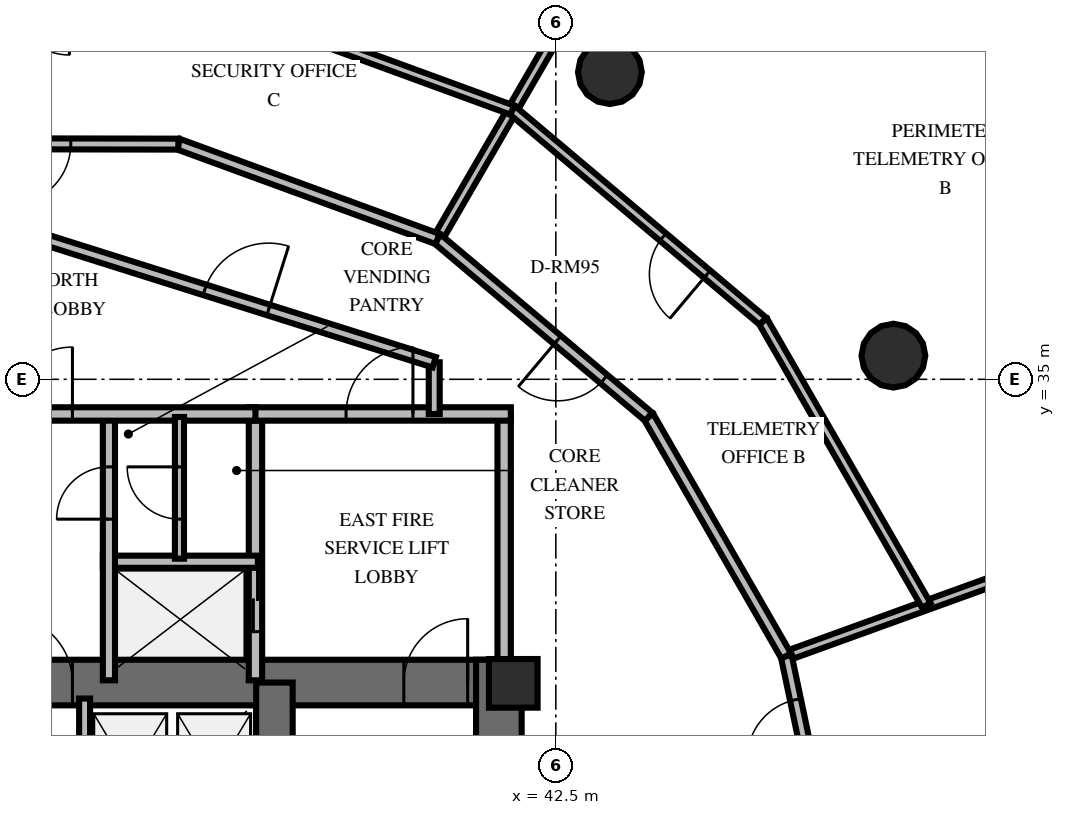
"""IFC4 building model, lengths in metres.
Left out: names, types, materials, properties, quantities, classifications, styles, units other than length and angle.
Written with IfcOpenShell. Run it as: python <this file> out.ifc"""

import sys

from ifc_helpers import new_model, si_unit, direction, frame, frame_2d, origin, origin_2d, place, context, subcontext, project, spatial, rectangle, circle, extrude, element, fill, save


model = new_model("IFC4")
c1 = context("Model", 3, precision=1e-05, world=origin(), true_north=direction((0.0, 1.0)))
c2 = subcontext(c1, "Body", "Model", "MODEL_VIEW")
j1 = project(units=[si_unit("LENGTHUNIT", "METRE"), si_unit("PLANEANGLEUNIT", "RADIAN")], contexts=[c1])
p1 = place(None, origin())
s1 = spatial("IfcSite", under=j1, at=p1, CompositionType="ELEMENT")
p2 = place(p1, origin())
s2 = spatial("IfcBuilding", under=s1, at=p2, CompositionType="ELEMENT")
p3 = place(p2, frame((0.0, 0.0, 198.8)))
s3 = spatial("IfcBuildingStorey", under=s2, at=p3, CompositionType="ELEMENT", Elevation=198.8)
p4 = place(p3, frame((26.072, 30.013, 0.0), z_axis=(0.0, 0.0, 1.0), x_axis=(1.0, 0.0, 0.0)))
e1 = element("IfcWall", 1, at=p4, inside=s3, PredefinedType="SHEAR", context=c2, shape_type="SweptSolid", body=[
    extrude(rectangle(XDim=15.866, YDim=0.75, at=frame_2d((7.933, 0.0))), origin(), (0.0, 0.0, 1.0), 3.6),
])
p5 = place(p4, frame((0.878, 0.0, 0.0)))
e2 = element("IfcOpeningElement", 2, at=p5, cuts=e1, PredefinedType="OPENING", context=c2, shape_type="SweptSolid", body=[
    extrude(rectangle(XDim=1.05, YDim=2.15, at=frame_2d((0.525, 1.075))), frame((0.0, 0.385, 0.0), z_axis=(0.0, -1.0, 0.0), x_axis=(1.0, 0.0, 0.0)), (0.0, 0.0, 1.0), 0.77),
])
p6 = place(p4, frame((13.928, 0.0, 0.0)))
e3 = element("IfcOpeningElement", 3, at=p6, cuts=e1, PredefinedType="OPENING", context=c2, shape_type="SweptSolid", body=[
    extrude(rectangle(XDim=1.05, YDim=2.15, at=frame_2d((0.525, 1.075))), frame((0.0, 0.385, 0.0), z_axis=(0.0, -1.0, 0.0), x_axis=(1.0, 0.0, 0.0)), (0.0, 0.0, 1.0), 0.77),
])
p7 = place(p4, frame((7.378, 0.0, 0.0)))
e4 = element("IfcOpeningElement", 4, at=p7, cuts=e1, PredefinedType="OPENING", context=c2, shape_type="SweptSolid", body=[
    extrude(rectangle(XDim=1.1, YDim=2.15, at=frame_2d((0.55, 1.075))), frame((0.0, 0.385, 0.0), z_axis=(0.0, -1.0, 0.0), x_axis=(1.0, 0.0, 0.0)), (0.0, 0.0, 1.0), 0.77),
])
p8 = place(p3, frame((41.563, 19.812, 0.0), z_axis=(0.0, 0.0, 1.0), x_axis=(0.0, 1.0, 0.0)))
e5 = element("IfcWall", 5, at=p8, inside=s3, PredefinedType="SHEAR", context=c2, shape_type="SweptSolid", body=[
    extrude(rectangle(XDim=10.576, YDim=0.75, at=frame_2d((5.288, 0.0))), origin(), (0.0, 0.0, 1.0), 3.6),
])
p9 = place(p3, frame((37.872, 20.187, 0.0), z_axis=(0.0, 0.0, 1.0), x_axis=(0.0, 1.0, 0.0)))
e6 = element("IfcWall", 6, at=p9, inside=s3, PredefinedType="SHEAR", context=c2, shape_type="SweptSolid", body=[
    extrude(rectangle(XDim=9.826, YDim=0.6, at=frame_2d((4.913, 0.0))), origin(), (0.0, 0.0, 1.0), 3.6),
])
p10 = place(p3, frame((41.8, 30.0, 0.0), z_axis=(0.0, 0.0, 1.0), x_axis=(1.0, 0.0, 0.0)))
e7 = element("IfcColumn", 7, at=p10, inside=s3, PredefinedType="PILASTER", context=c2, shape_type="SweptSolid", body=[
    extrude(rectangle(XDim=0.8, YDim=0.8, at=origin_2d()), origin(), (0.0, 0.0, 1.0), 3.6),
])
for number, where, z_axis, x_axis in (
    (8, (48.052, 35.389, 0.0), (0.0, 0.0, 1.0), (1.0, 0.0, 0.0)),
    (9, (43.389, 40.052, 0.0), (0.0, 0.0, 1.0), (1.0, 0.0, 0.0)),
):
    element("IfcColumn", number, at=place(p3, frame(where, z_axis=z_axis, x_axis=x_axis)), inside=s3, PredefinedType="COLUMN", context=c2, shape_type="SweptSolid", body=[
        extrude(circle(Radius=0.525, at=origin_2d()), origin(), (0.0, 0.0, 1.0), 3.6),
    ])
p11 = place(p3, frame((37.56, 30.05, 0.0), z_axis=(0.0, 0.0, 1.0), x_axis=(0.0, 1.0, 0.0)))
e10 = element("IfcWall", 10, at=p11, inside=s3, PredefinedType="SOLIDWALL", context=c2, shape_type="SweptSolid", body=[
    extrude(rectangle(XDim=4.38, YDim=0.22, at=frame_2d((2.19, 0.0))), origin(), (0.0, 0.0, 1.0), 2.46),
])
p12 = place(p11, frame((0.8, 0.0, 0.0)))
e11 = element("IfcOpeningElement", 11, at=p12, cuts=e10, PredefinedType="OPENING", context=c2, shape_type="SweptSolid", body=[
    extrude(rectangle(XDim=1.05, YDim=2.1, at=frame_2d((0.525, 1.05))), frame((0.0, 0.12, 0.0), z_axis=(0.0, -1.0, 0.0), x_axis=(1.0, 0.0, 0.0)), (0.0, 0.0, 1.0), 0.24),
])
p13 = place(p3, frame((41.65, 30.05, 0.0), z_axis=(0.0, 0.0, 1.0), x_axis=(0.0, 1.0, 0.0)))
e12 = element("IfcWall", 12, at=p13, inside=s3, PredefinedType="SOLIDWALL", context=c2, shape_type="SweptSolid", body=[
    extrude(rectangle(XDim=4.38, YDim=0.22, at=frame_2d((2.19, 0.0))), origin(), (0.0, 0.0, 1.0), 2.46),
])
p14 = place(p3, frame((37.45, 34.43, 0.0), z_axis=(0.0, 0.0, 1.0), x_axis=(1.0, 0.0, 0.0)))
e13 = element("IfcWall", 13, at=p14, inside=s3, PredefinedType="SOLIDWALL", context=c2, shape_type="SweptSolid", body=[
    extrude(rectangle(XDim=4.31, YDim=0.22, at=frame_2d((2.155, 0.0))), origin(), (0.0, 0.0, 1.0), 2.46),
])
p15 = place(p14, frame((1.6, 0.0, 0.0)))
e14 = element("IfcOpeningElement", 14, at=p15, cuts=e13, PredefinedType="OPENING", context=c2, shape_type="SweptSolid", body=[
    extrude(rectangle(XDim=1.1, YDim=2.15, at=frame_2d((0.55, 1.075))), frame((0.0, 0.12, 0.0), z_axis=(0.0, -1.0, 0.0), x_axis=(1.0, 0.0, 0.0)), (0.0, 0.0, 1.0), 0.24),
])
p16 = place(p3, frame((35.05, 32.0, 0.0), z_axis=(0.0, 0.0, 1.0), x_axis=(1.0, 0.0, 0.0)))
e15 = element("IfcWall", 15, at=p16, inside=s3, PredefinedType="SOLIDWALL", context=c2, shape_type="SweptSolid", body=[
    extrude(rectangle(XDim=2.55, YDim=0.2, at=frame_2d((1.275, 0.0))), origin(), (0.0, 0.0, 1.0), 2.46),
])
p17 = place(p3, frame((35.15, 30.05, 0.0), z_axis=(0.0, 0.0, 1.0), x_axis=(0.0, 1.0, 0.0)))
e16 = element("IfcWall", 16, at=p17, inside=s3, PredefinedType="SOLIDWALL", context=c2, shape_type="SweptSolid", body=[
    extrude(rectangle(XDim=4.38, YDim=0.2, at=frame_2d((2.19, 0.0))), origin(), (0.0, 0.0, 1.0), 2.46),
])
p18 = place(p17, frame((2.65, 0.0, 0.0)))
e17 = element("IfcOpeningElement", 17, at=p18, cuts=e16, PredefinedType="OPENING", context=c2, shape_type="SweptSolid", body=[
    extrude(rectangle(XDim=0.86, YDim=2.05, at=frame_2d((0.43, 1.025))), frame((0.0, 0.11, 0.0), z_axis=(0.0, -1.0, 0.0), x_axis=(1.0, 0.0, 0.0)), (0.0, 0.0, 1.0), 0.22),
])
p19 = place(p3, frame((30.44, 34.43, 0.0), z_axis=(0.0, 0.0, 1.0), x_axis=(1.0, 0.0, 0.0)))
e18 = element("IfcWall", 18, at=p19, inside=s3, PredefinedType="SOLIDWALL", context=c2, shape_type="SweptSolid", body=[
    extrude(rectangle(XDim=7.12, YDim=0.22, at=frame_2d((3.56, 0.0))), origin(), (0.0, 0.0, 1.0), 2.46),
])
p20 = place(p19, frame((3.01, 0.0, 0.0)))
e19 = element("IfcOpeningElement", 19, at=p20, cuts=e18, PredefinedType="OPENING", context=c2, shape_type="SweptSolid", body=[
    extrude(rectangle(XDim=1.1, YDim=2.15, at=frame_2d((0.55, 1.075))), frame((0.0, 0.12, 0.0), z_axis=(0.0, -1.0, 0.0), x_axis=(1.0, 0.0, 0.0)), (0.0, 0.0, 1.0), 0.24),
])
p21 = place(p3, frame((36.31, 32.05, 0.0), z_axis=(0.0, 0.0, 1.0), x_axis=(0.0, 1.0, 0.0)))
e20 = element("IfcWall", 20, at=p21, inside=s3, PredefinedType="PARTITIONING", context=c2, shape_type="SweptSolid", body=[
    extrude(rectangle(XDim=2.33, YDim=0.15, at=frame_2d((1.165, 0.0))), origin(), (0.0, 0.0, 1.0), 2.46),
])
p22 = place(p21, frame((0.65, 0.0, 0.0)))
e21 = element("IfcOpeningElement", 21, at=p22, cuts=e20, PredefinedType="OPENING", context=c2, shape_type="SweptSolid", body=[
    extrude(rectangle(XDim=0.86, YDim=2.05, at=frame_2d((0.43, 1.025))), frame((0.0, 0.085, 0.0), z_axis=(0.0, -1.0, 0.0), x_axis=(1.0, 0.0, 0.0)), (0.0, 0.0, 1.0), 0.17),
])
p23 = place(p3, frame((34.75, 27.28, 0.0), z_axis=(0.0, 0.0, 1.0), x_axis=(0.0, 1.0, 0.0)))
e22 = element("IfcWall", 22, at=p23, inside=s3, PredefinedType="SOLIDWALL", context=c2, shape_type="SweptSolid", body=[
    extrude(rectangle(XDim=2.47, YDim=0.18, at=frame_2d((1.235, 0.0))), origin(), (0.0, 0.0, 1.0), 2.46),
])
p24 = place(p3, frame((40.5, 35.28, 0.0), z_axis=(0.0, 0.0, 1.0), x_axis=(0.0, -1.0, 0.0)))
e23 = element("IfcWall", 23, at=p24, inside=s3, PredefinedType="PARTITIONING", context=c2, shape_type="SweptSolid", body=[
    extrude(rectangle(XDim=0.85, YDim=0.18, at=frame_2d((0.425, 0.0))), origin(), (0.0, 0.0, 1.0), 2.46),
])
p25 = place(p3, frame((34.0, 37.33, 0.0), z_axis=(0.0, 0.0, 1.0), x_axis=(0.953691418528, -0.300786765376, 0.0)))
e24 = element("IfcWall", 24, at=p25, inside=s3, PredefinedType="PARTITIONING", context=c2, shape_type="SweptSolid", body=[
    extrude(rectangle(XDim=6.816, YDim=0.18, at=frame_2d((3.408, 0.0))), origin(), (0.0, 0.0, 1.0), 2.46),
])
p26 = place(p25, frame((2.858, 0.0, 0.0)))
e25 = element("IfcOpeningElement", 25, at=p26, cuts=e24, PredefinedType="OPENING", context=c2, shape_type="SweptSolid", body=[
    extrude(rectangle(XDim=1.1, YDim=2.15, at=frame_2d((0.55, 1.075))), frame((0.0, 0.1, 0.0), z_axis=(0.0, -1.0, 0.0), x_axis=(1.0, 0.0, 0.0)), (0.0, 0.0, 1.0), 0.2),
])
p27 = place(p3, frame((46.29, 30.449, 0.0), z_axis=(0.0, 0.0, 1.0), x_axis=(0.940289029267, 0.340377057746, 0.0)))
e26 = element("IfcWall", 26, at=p27, inside=s3, PredefinedType="PARTITIONING", context=c2, shape_type="SweptSolid", body=[
    extrude(rectangle(XDim=9.416, YDim=0.16, at=frame_2d((4.708, 0.0))), origin(), (0.0, 0.0, 1.0), 2.46),
])
p28 = place(p3, frame((47.04, 26.889, 0.0), z_axis=(0.0, 0.0, 1.0), x_axis=(-0.206223549204, 0.978504904308, 0.0)))
e27 = element("IfcWall", 27, at=p28, inside=s3, PredefinedType="PARTITIONING", context=c2, shape_type="SweptSolid", body=[
    extrude(rectangle(XDim=3.638, YDim=0.18, at=frame_2d((1.819, 0.0))), origin(), (0.0, 0.0, 1.0), 2.46),
])
p29 = place(p28, frame((1.904, 0.0, 0.0)))
e28 = element("IfcOpeningElement", 28, at=p29, cuts=e27, PredefinedType="OPENING", context=c2, shape_type="SweptSolid", body=[
    extrude(rectangle(XDim=1.0, YDim=2.15, at=frame_2d((0.5, 1.075))), frame((0.0, 0.1, 0.0), z_axis=(0.0, -1.0, 0.0), x_axis=(1.0, 0.0, 0.0)), (0.0, 0.0, 1.0), 0.2),
])
p30 = place(p3, frame((40.555, 37.308, 0.0), z_axis=(0.0, 0.0, 1.0), x_axis=(0.501515529592, 0.865148642476, 0.0)))
e29 = element("IfcWall", 29, at=p30, inside=s3, PredefinedType="PARTITIONING", context=c2, shape_type="SweptSolid", body=[
    extrude(rectangle(XDim=9.416, YDim=0.16, at=frame_2d((4.708, 0.0))), origin(), (0.0, 0.0, 1.0), 2.46),
])
p31 = place(p3, frame((46.29, 30.449, 0.0), z_axis=(0.0, 0.0, 1.0), x_axis=(-0.498477187347, 0.866902816753, 0.0)))
e30 = element("IfcWall", 30, at=p31, inside=s3, PredefinedType="PARTITIONING", context=c2, shape_type="SweptSolid", body=[
    extrude(rectangle(XDim=4.539, YDim=0.18, at=frame_2d((2.27, 0.0))), origin(), (0.0, 0.0, 1.0), 2.46),
])
p32 = place(p3, frame((44.027, 34.384, 0.0), z_axis=(0.0, 0.0, 1.0), x_axis=(-0.764922355877, 0.64412249571, 0.0)))
e31 = element("IfcWall", 31, at=p32, inside=s3, PredefinedType="PARTITIONING", context=c2, shape_type="SweptSolid", body=[
    extrude(rectangle(XDim=4.539, YDim=0.18, at=frame_2d((2.27, 0.0))), origin(), (0.0, 0.0, 1.0), 2.46),
])
p33 = place(p32, frame((0.96, 0.0, 0.0)))
e32 = element("IfcOpeningElement", 32, at=p33, cuts=e31, PredefinedType="OPENING", context=c2, shape_type="SweptSolid", body=[
    extrude(rectangle(XDim=1.0, YDim=2.15, at=frame_2d((0.5, 1.075))), frame((0.0, 0.1, 0.0), z_axis=(0.0, -1.0, 0.0), x_axis=(1.0, 0.0, 0.0)), (0.0, 0.0, 1.0), 0.2),
])
p34 = place(p3, frame((48.593, 31.283, 0.0), z_axis=(0.0, 0.0, 1.0), x_axis=(-0.498473677297, 0.866904835055, 0.0)))
e33 = element("IfcWall", 33, at=p34, inside=s3, PredefinedType="PARTITIONING", context=c2, shape_type="SweptSolid", body=[
    extrude(rectangle(XDim=5.39, YDim=0.16, at=frame_2d((2.695, 0.0))), origin(), (0.0, 0.0, 1.0), 2.46),
])
p35 = place(p3, frame((45.906, 35.955, 0.0), z_axis=(0.0, 0.0, 1.0), x_axis=(-0.764921769015, 0.644123192632, 0.0)))
e34 = element("IfcWall", 34, at=p35, inside=s3, PredefinedType="PARTITIONING", context=c2, shape_type="SweptSolid", body=[
    extrude(rectangle(XDim=5.39, YDim=0.16, at=frame_2d((2.695, 0.0))), origin(), (0.0, 0.0, 1.0), 2.46),
])
p36 = place(p35, frame((1.2, 0.0, 0.0)))
e35 = element("IfcOpeningElement", 35, at=p36, cuts=e34, PredefinedType="OPENING", context=c2, shape_type="SweptSolid", body=[
    extrude(rectangle(XDim=0.95, YDim=2.15, at=frame_2d((0.475, 1.075))), frame((0.0, 0.09, 0.0), z_axis=(0.0, -1.0, 0.0), x_axis=(1.0, 0.0, 0.0)), (0.0, 0.0, 1.0), 0.18),
])
p37 = place(p3, frame((40.555, 37.308, 0.0), z_axis=(0.0, 0.0, 1.0), x_axis=(-0.93910210925, 0.343638223139, 0.0)))
e36 = element("IfcWall", 36, at=p37, inside=s3, PredefinedType="PARTITIONING", context=c2, shape_type="SweptSolid", body=[
    extrude(rectangle(XDim=4.539, YDim=0.18, at=frame_2d((2.27, 0.0))), origin(), (0.0, 0.0, 1.0), 2.46),
])
p38 = place(p3, frame((36.292, 38.867, 0.0), z_axis=(0.0, 0.0, 1.0), x_axis=(-0.999998424768, 0.001774954175, 0.0)))
e37 = element("IfcWall", 37, at=p38, inside=s3, PredefinedType="PARTITIONING", context=c2, shape_type="SweptSolid", body=[
    extrude(rectangle(XDim=4.539, YDim=0.18, at=frame_2d((2.27, 0.0))), origin(), (0.0, 0.0, 1.0), 2.46),
])
p39 = place(p38, frame((1.77, 0.0, 0.0)))
e38 = element("IfcOpeningElement", 38, at=p39, cuts=e37, PredefinedType="OPENING", context=c2, shape_type="SweptSolid", body=[
    extrude(rectangle(XDim=1.0, YDim=2.15, at=frame_2d((0.5, 1.075))), frame((0.0, 0.1, 0.0), z_axis=(0.0, -1.0, 0.0), x_axis=(1.0, 0.0, 0.0)), (0.0, 0.0, 1.0), 0.2),
])
p40 = place(p3, frame((41.783, 39.427, 0.0), z_axis=(0.0, 0.0, 1.0), x_axis=(-0.939097184028, 0.343651682594, 0.0)))
e39 = element("IfcWall", 39, at=p40, inside=s3, PredefinedType="PARTITIONING", context=c2, shape_type="SweptSolid", body=[
    extrude(rectangle(XDim=5.39, YDim=0.16, at=frame_2d((2.695, 0.0))), origin(), (0.0, 0.0, 1.0), 2.46),
])
p41 = place(p6, origin())
e40 = element("IfcDoor", 40, at=p41, inside=s3, OperationType="SINGLE_SWING_RIGHT", PredefinedType="DOOR", context=c2, shape_type="SweptSolid", body=[
    extrude(rectangle(XDim=1.05, YDim=2.15, at=frame_2d((0.525, 1.075))), frame((0.0, 0.025, 0.0), z_axis=(0.0, -1.0, 0.0), x_axis=(1.0, 0.0, 0.0)), (0.0, 0.0, 1.0), 0.05),
])
fill(e3, e40)
p42 = place(p7, origin())
e41 = element("IfcDoor", 41, at=p42, inside=s3, OperationType="SINGLE_SWING_LEFT", PredefinedType="DOOR", context=c2, shape_type="SweptSolid", body=[
    extrude(rectangle(XDim=1.1, YDim=2.15, at=frame_2d((0.55, 1.075))), frame((0.0, 0.025, 0.0), z_axis=(0.0, -1.0, 0.0), x_axis=(1.0, 0.0, 0.0)), (0.0, 0.0, 1.0), 0.05),
])
fill(e4, e41)
p43 = place(p15, origin())
e42 = element("IfcDoor", 42, at=p43, inside=s3, OperationType="SINGLE_SWING_RIGHT", PredefinedType="DOOR", context=c2, shape_type="SweptSolid", body=[
    extrude(rectangle(XDim=1.1, YDim=2.15, at=frame_2d((0.55, 1.075))), frame((0.0, 0.025, 0.0), z_axis=(0.0, -1.0, 0.0), x_axis=(1.0, 0.0, 0.0)), (0.0, 0.0, 1.0), 0.05),
])
fill(e14, e42)
p44 = place(p12, origin())
e43 = element("IfcDoor", 43, at=p44, inside=s3, OperationType="DOUBLE_DOOR_SLIDING", PredefinedType="USERDEFINED", context=c2, shape_type="SweptSolid", body=[
    extrude(rectangle(XDim=1.05, YDim=2.1, at=frame_2d((0.525, 1.05))), frame((0.0, 0.025, 0.0), z_axis=(0.0, -1.0, 0.0), x_axis=(1.0, 0.0, 0.0)), (0.0, 0.0, 1.0), 0.05),
])
fill(e11, e43)
p45 = place(p18, origin())
e44 = element("IfcDoor", 44, at=p45, inside=s3, OperationType="SINGLE_SWING_LEFT", PredefinedType="TRAPDOOR", context=c2, shape_type="SweptSolid", body=[
    extrude(rectangle(XDim=0.86, YDim=2.05, at=frame_2d((0.43, 1.025))), frame((0.0, 0.025, 0.0), z_axis=(0.0, -1.0, 0.0), x_axis=(1.0, 0.0, 0.0)), (0.0, 0.0, 1.0), 0.05),
])
fill(e17, e44)
p46 = place(p20, origin())
e45 = element("IfcDoor", 45, at=p46, inside=s3, OperationType="SINGLE_SWING_RIGHT", PredefinedType="DOOR", context=c2, shape_type="SweptSolid", body=[
    extrude(rectangle(XDim=1.1, YDim=2.15, at=frame_2d((0.55, 1.075))), frame((0.0, 0.025, 0.0), z_axis=(0.0, -1.0, 0.0), x_axis=(1.0, 0.0, 0.0)), (0.0, 0.0, 1.0), 0.05),
])
fill(e19, e45)
p47 = place(p22, origin())
e46 = element("IfcDoor", 46, at=p47, inside=s3, OperationType="SINGLE_SWING_RIGHT", PredefinedType="TRAPDOOR", context=c2, shape_type="SweptSolid", body=[
    extrude(rectangle(XDim=0.86, YDim=2.05, at=frame_2d((0.43, 1.025))), frame((0.0, 0.025, 0.0), z_axis=(0.0, -1.0, 0.0), x_axis=(1.0, 0.0, 0.0)), (0.0, 0.0, 1.0), 0.05),
])
fill(e21, e46)
p48 = place(p26, origin())
e47 = element("IfcDoor", 47, at=p48, inside=s3, OperationType="SINGLE_SWING_RIGHT", PredefinedType="DOOR", context=c2, shape_type="SweptSolid", body=[
    extrude(rectangle(XDim=1.1, YDim=2.15, at=frame_2d((0.55, 1.075))), frame((0.0, 0.025, 0.0), z_axis=(0.0, -1.0, 0.0), x_axis=(1.0, 0.0, 0.0)), (0.0, 0.0, 1.0), 0.05),
])
fill(e25, e47)
p49 = place(p29, origin())
e48 = element("IfcDoor", 48, at=p49, inside=s3, OperationType="SINGLE_SWING_LEFT", PredefinedType="DOOR", context=c2, shape_type="SweptSolid", body=[
    extrude(rectangle(XDim=1.0, YDim=2.15, at=frame_2d((0.5, 1.075))), frame((0.0, 0.025, 0.0), z_axis=(0.0, -1.0, 0.0), x_axis=(1.0, 0.0, 0.0)), (0.0, 0.0, 1.0), 0.05),
])
fill(e28, e48)
p50 = place(p33, origin())
e49 = element("IfcDoor", 49, at=p50, inside=s3, OperationType="SINGLE_SWING_RIGHT", PredefinedType="DOOR", context=c2, shape_type="SweptSolid", body=[
    extrude(rectangle(XDim=1.0, YDim=2.15, at=frame_2d((0.5, 1.075))), frame((0.0, 0.025, 0.0), z_axis=(0.0, -1.0, 0.0), x_axis=(1.0, 0.0, 0.0)), (0.0, 0.0, 1.0), 0.05),
])
fill(e32, e49)
p51 = place(p36, origin())
e50 = element("IfcDoor", 50, at=p51, inside=s3, OperationType="SINGLE_SWING_LEFT", PredefinedType="DOOR", context=c2, shape_type="SweptSolid", body=[
    extrude(rectangle(XDim=0.95, YDim=2.15, at=frame_2d((0.475, 1.075))), frame((0.0, 0.025, 0.0), z_axis=(0.0, -1.0, 0.0), x_axis=(1.0, 0.0, 0.0)), (0.0, 0.0, 1.0), 0.05),
])
fill(e35, e50)
p52 = place(p39, origin())
e51 = element("IfcDoor", 51, at=p52, inside=s3, OperationType="SINGLE_SWING_RIGHT", PredefinedType="DOOR", context=c2, shape_type="SweptSolid", body=[
    extrude(rectangle(XDim=1.0, YDim=2.15, at=frame_2d((0.5, 1.075))), frame((0.0, 0.025, 0.0), z_axis=(0.0, -1.0, 0.0), x_axis=(1.0, 0.0, 0.0)), (0.0, 0.0, 1.0), 0.05),
])
fill(e38, e51)
save(model, sys.argv[1])
